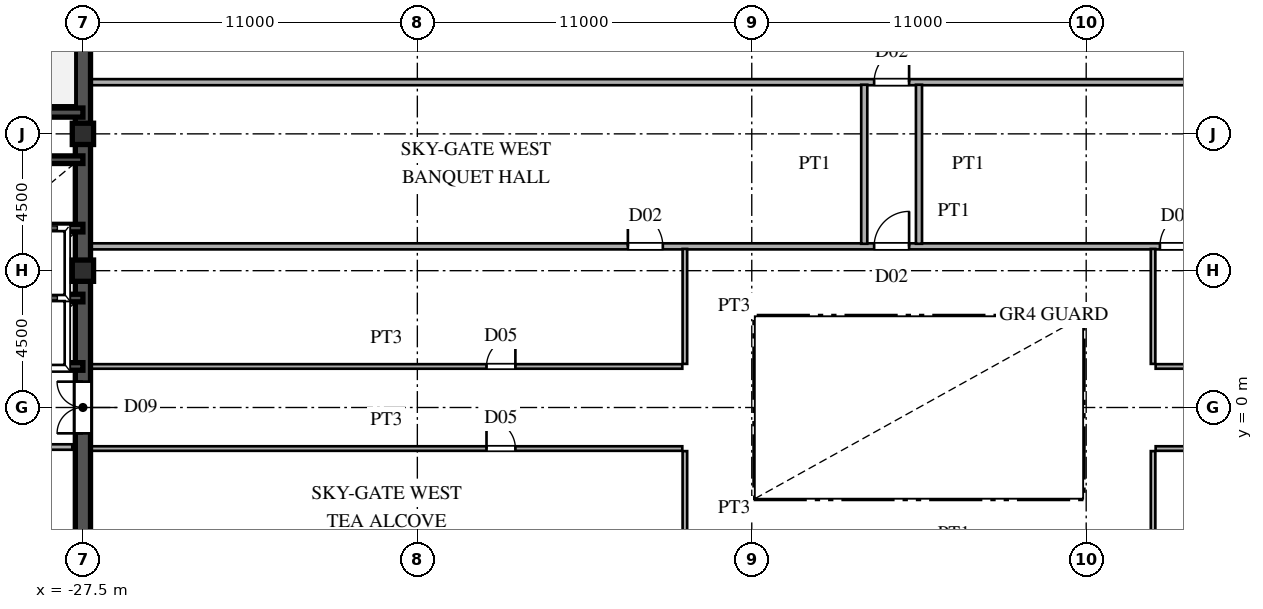
"""IFC4 building model, lengths in metres.
Left out: names, types, materials, properties, quantities, classifications, styles, units other than length and angle.
Written with IfcOpenShell. Run it as: python <this file> out.ifc"""

import sys

from ifc_helpers import new_model, si_unit, direction, frame, frame_2d, origin, origin_2d, place, context, subcontext, project, spatial, rectangle, hollow_rectangle, extrude, source, transform, mapped, element, fill, save


model = new_model("IFC4")
c1 = context("Model", 3, precision=1e-05, world=origin(), true_north=direction((0.0, 1.0)))
c2 = subcontext(c1, "Body", "Model", "MODEL_VIEW")
j1 = project(units=[si_unit("LENGTHUNIT", "METRE"), si_unit("PLANEANGLEUNIT", "RADIAN")], contexts=[c1])
p1 = place(None, origin())
s1 = spatial("IfcSite", under=j1, at=p1, CompositionType="ELEMENT")
p2 = place(p1, origin())
s2 = spatial("IfcBuilding", under=s1, at=p2, CompositionType="ELEMENT")
p3 = place(p2, frame((0.0, 0.0, 234.6)))
s3 = spatial("IfcBuildingStorey", under=s2, at=p3, CompositionType="ELEMENT", Elevation=234.6)
m1 = source(origin(), c2, "Body", "SweptSolid", [
    extrude(hollow_rectangle(XDim=0.7, YDim=0.7, WallThickness=0.03, at=origin_2d()), origin(), (0.0, 0.0, 1.0), 4.8),
])
for number, where, z_axis, x_axis in (
    (1, (-27.5, 4.5, 0.0), (0.0, 0.0, 1.0), (1.0, 0.0, 0.0)),
    (2, (-27.5, 9.0, 0.0), (0.0, 0.0, 1.0), (1.0, 0.0, 0.0)),
):
    element("IfcColumn", number, at=place(p3, frame(where, z_axis=z_axis, x_axis=x_axis)), inside=s3, PredefinedType="COLUMN", context=c2, shape_type="MappedRepresentation", body=[
        mapped(m1, transform((0.0, 0.0, 0.0), scale=1.0)),
    ])
for number, where, z_axis, x_axis in (
    (3, (-27.5, -13.5, 0.0), (0.0, 0.0, 1.0), (0.0, 1.0, 0.0)),
    (4, (-27.5, 1.3, 0.0), (0.0, 0.0, 1.0), (0.0, 1.0, 0.0)),
):
    element("IfcWall", number, at=place(p3, frame(where, z_axis=z_axis, x_axis=x_axis)), inside=s3, PredefinedType="SHEAR", context=c2, shape_type="SweptSolid", body=[
        extrude(rectangle(XDim=12.2, YDim=0.5, at=frame_2d((6.1, 0.0))), origin(), (0.0, 0.0, 1.0), 4.58),
    ])
p4 = place(p3, frame((-27.5, -1.3, 0.0), z_axis=(0.0, 0.0, 1.0), x_axis=(0.0, 1.0, 0.0)))
e5 = element("IfcWall", 5, at=p4, inside=s3, PredefinedType="SHEAR", context=c2, shape_type="SweptSolid", body=[
    extrude(rectangle(XDim=2.6, YDim=0.5, at=frame_2d((1.3, 0.0))), origin(), (0.0, 0.0, 1.0), 4.58),
])
p5 = place(p4, frame((0.45, 0.0, 0.0)))
e6 = element("IfcOpeningElement", 6, at=p5, cuts=e5, PredefinedType="OPENING", context=c2, shape_type="SweptSolid", body=[
    extrude(rectangle(XDim=1.7, YDim=2.35, at=frame_2d((0.85, 1.175))), frame((0.0, 0.26, 0.0), z_axis=(0.0, -1.0, 0.0), x_axis=(1.0, 0.0, 0.0)), (0.0, 0.0, 1.0), 0.52),
])
p6 = place(p3, frame((-36.5, 9.7, 0.0), z_axis=(0.0, 0.0, 1.0), x_axis=(1.0, 0.0, 0.0)))
e7 = element("IfcWall", 7, at=p6, inside=s3, PredefinedType="SHEAR", context=c2, shape_type="SweptSolid", body=[
    extrude(rectangle(XDim=9.0, YDim=0.3, at=frame_2d((4.5, 0.0))), origin(), (0.0, 0.0, 1.0), 4.58),
])
p7 = place(p6, frame((0.6, 0.0, 0.0)))
e8 = element("IfcOpeningElement", 8, at=p7, cuts=e7, PredefinedType="OPENING", context=c2, shape_type="SweptSolid", body=[
    extrude(rectangle(XDim=1.1, YDim=2.2, at=frame_2d((0.55, 1.1))), frame((0.0, 0.16, 0.0), z_axis=(0.0, -1.0, 0.0), x_axis=(1.0, 0.0, 0.0)), (0.0, 0.0, 1.0), 0.32),
])
for number, where, z_axis, x_axis in (
    (9, (-30.3, 1.35, 0.0), (0.0, 0.0, 1.0), (1.0, 0.0, 0.0)),
    (10, (-30.3, 3.6, 0.0), (0.0, 0.0, 1.0), (1.0, 0.0, 0.0)),
    (11, (-30.3, 5.9, 0.0), (0.0, 0.0, 1.0), (1.0, 0.0, 0.0)),
    (12, (-30.3, 8.15, 0.0), (0.0, 0.0, 1.0), (1.0, 0.0, 0.0)),
):
    element("IfcWall", number, at=place(p3, frame(where, z_axis=z_axis, x_axis=x_axis)), inside=s3, PredefinedType="SHEAR", context=c2, shape_type="SweptSolid", body=[
        extrude(rectangle(XDim=2.8, YDim=0.25, at=frame_2d((1.4, 0.0))), origin(), (0.0, 0.0, 1.0), 4.58),
    ])
p8 = place(p3, frame((-33.02, -1.3, 0.0), z_axis=(0.0, 0.0, 1.0), x_axis=(1.0, 0.0, 0.0)))
e13 = element("IfcWall", 13, at=p8, inside=s3, PredefinedType="PARTITIONING", context=c2, shape_type="SweptSolid", body=[
    extrude(rectangle(XDim=5.17, YDim=0.18, at=frame_2d((2.585, 0.0))), origin(), (0.0, 0.0, 1.0), 4.58),
])
p9 = place(p8, frame((2.01, 0.0, 0.0)))
e14 = element("IfcOpeningElement", 14, at=p9, cuts=e13, PredefinedType="OPENING", context=c2, shape_type="SweptSolid", body=[
    extrude(rectangle(XDim=1.15, YDim=2.2, at=frame_2d((0.575, 1.1))), frame((0.0, 0.1, 0.0), z_axis=(0.0, -1.0, 0.0), x_axis=(1.0, 0.0, 0.0)), (0.0, 0.0, 1.0), 0.2),
])
p10 = place(p3, frame((-27.245, -1.35, 0.0), z_axis=(0.0, 0.0, 1.0), x_axis=(1.0, 0.0, 0.0)))
e15 = element("IfcWall", 15, at=p10, inside=s3, PredefinedType="PARTITIONING", context=c2, shape_type="SweptSolid", body=[
    extrude(rectangle(XDim=19.46, YDim=0.15, at=frame_2d((9.73, 0.0))), origin(), (0.0, 0.0, 1.0), 4.58),
])
p11 = place(p10, frame((13.02, 0.0, 0.0)))
e16 = element("IfcOpeningElement", 16, at=p11, cuts=e15, PredefinedType="OPENING", context=c2, shape_type="SweptSolid", body=[
    extrude(rectangle(XDim=0.95, YDim=2.15, at=frame_2d((0.475, 1.075))), frame((0.0, 0.085, 0.0), z_axis=(0.0, -1.0, 0.0), x_axis=(1.0, 0.0, 0.0)), (0.0, 0.0, 1.0), 0.17),
])
p12 = place(p3, frame((7.785, -1.35, 0.0), z_axis=(0.0, 0.0, 1.0), x_axis=(1.0, 0.0, 0.0)))
e17 = element("IfcWall", 17, at=p12, inside=s3, PredefinedType="PARTITIONING", context=c2, shape_type="SweptSolid", body=[
    extrude(rectangle(XDim=19.46, YDim=0.15, at=frame_2d((9.73, 0.0))), origin(), (0.0, 0.0, 1.0), 4.58),
])
p13 = place(p12, frame((5.49, 0.0, 0.0)))
e18 = element("IfcOpeningElement", 18, at=p13, cuts=e17, PredefinedType="OPENING", context=c2, shape_type="SweptSolid", body=[
    extrude(rectangle(XDim=0.95, YDim=2.15, at=frame_2d((0.475, 1.075))), frame((0.0, 0.085, 0.0), z_axis=(0.0, -1.0, 0.0), x_axis=(1.0, 0.0, 0.0)), (0.0, 0.0, 1.0), 0.17),
])
p14 = place(p3, frame((-27.245, 1.35, 0.0), z_axis=(0.0, 0.0, 1.0), x_axis=(1.0, 0.0, 0.0)))
e19 = element("IfcWall", 19, at=p14, inside=s3, PredefinedType="PARTITIONING", context=c2, shape_type="SweptSolid", body=[
    extrude(rectangle(XDim=19.46, YDim=0.15, at=frame_2d((9.73, 0.0))), origin(), (0.0, 0.0, 1.0), 4.58),
])
p15 = place(p14, frame((13.02, 0.0, 0.0)))
e20 = element("IfcOpeningElement", 20, at=p15, cuts=e19, PredefinedType="OPENING", context=c2, shape_type="SweptSolid", body=[
    extrude(rectangle(XDim=0.95, YDim=2.15, at=frame_2d((0.475, 1.075))), frame((0.0, 0.085, 0.0), z_axis=(0.0, -1.0, 0.0), x_axis=(1.0, 0.0, 0.0)), (0.0, 0.0, 1.0), 0.17),
])
p16 = place(p3, frame((7.785, 1.35, 0.0), z_axis=(0.0, 0.0, 1.0), x_axis=(1.0, 0.0, 0.0)))
e21 = element("IfcWall", 21, at=p16, inside=s3, PredefinedType="PARTITIONING", context=c2, shape_type="SweptSolid", body=[
    extrude(rectangle(XDim=19.46, YDim=0.15, at=frame_2d((9.73, 0.0))), origin(), (0.0, 0.0, 1.0), 4.58),
])
p17 = place(p16, frame((5.49, 0.0, 0.0)))
e22 = element("IfcOpeningElement", 22, at=p17, cuts=e21, PredefinedType="OPENING", context=c2, shape_type="SweptSolid", body=[
    extrude(rectangle(XDim=0.95, YDim=2.15, at=frame_2d((0.475, 1.075))), frame((0.0, 0.085, 0.0), z_axis=(0.0, -1.0, 0.0), x_axis=(1.0, 0.0, 0.0)), (0.0, 0.0, 1.0), 0.17),
])
p18 = place(p3, frame((-27.245, 5.3, 0.0), z_axis=(0.0, 0.0, 1.0), x_axis=(1.0, 0.0, 0.0)))
e23 = element("IfcWall", 23, at=p18, inside=s3, PredefinedType="PARTITIONING", context=c2, shape_type="SweptSolid", body=[
    extrude(rectangle(XDim=54.49, YDim=0.2, at=frame_2d((27.245, 0.0))), origin(), (0.0, 0.0, 1.0), 4.58),
])
p19 = place(p18, frame((25.77, 0.0, 0.0)))
e24 = element("IfcOpeningElement", 24, at=p19, cuts=e23, PredefinedType="OPENING", context=c2, shape_type="SweptSolid", body=[
    extrude(rectangle(XDim=1.15, YDim=2.2, at=frame_2d((0.575, 1.1))), frame((0.0, 0.11, 0.0), z_axis=(0.0, -1.0, 0.0), x_axis=(1.0, 0.0, 0.0)), (0.0, 0.0, 1.0), 0.22),
])
p20 = place(p18, frame((35.17, 0.0, 0.0)))
e25 = element("IfcOpeningElement", 25, at=p20, cuts=e23, PredefinedType="OPENING", context=c2, shape_type="SweptSolid", body=[
    extrude(rectangle(XDim=1.15, YDim=2.2, at=frame_2d((0.575, 1.1))), frame((0.0, 0.11, 0.0), z_axis=(0.0, -1.0, 0.0), x_axis=(1.0, 0.0, 0.0)), (0.0, 0.0, 1.0), 0.22),
])
p21 = place(p18, frame((17.67, 0.0, 0.0)))
e26 = element("IfcOpeningElement", 26, at=p21, cuts=e23, PredefinedType="OPENING", context=c2, shape_type="SweptSolid", body=[
    extrude(rectangle(XDim=1.15, YDim=2.2, at=frame_2d((0.575, 1.1))), frame((0.0, 0.11, 0.0), z_axis=(0.0, -1.0, 0.0), x_axis=(1.0, 0.0, 0.0)), (0.0, 0.0, 1.0), 0.22),
])
p22 = place(p18, frame((46.055, 0.0, 0.0)))
e27 = element("IfcOpeningElement", 27, at=p22, cuts=e23, PredefinedType="OPENING", context=c2, shape_type="SweptSolid", body=[
    extrude(rectangle(XDim=0.88, YDim=2.1, at=frame_2d((0.44, 1.05))), frame((0.0, 0.11, 0.0), z_axis=(0.0, -1.0, 0.0), x_axis=(1.0, 0.0, 0.0)), (0.0, 0.0, 1.0), 0.22),
])
p23 = place(p18, frame((51.405, 0.0, 0.0)))
e28 = element("IfcOpeningElement", 28, at=p23, cuts=e23, PredefinedType="OPENING", context=c2, shape_type="SweptSolid", body=[
    extrude(rectangle(XDim=0.88, YDim=2.1, at=frame_2d((0.44, 1.05))), frame((0.0, 0.11, 0.0), z_axis=(0.0, -1.0, 0.0), x_axis=(1.0, 0.0, 0.0)), (0.0, 0.0, 1.0), 0.22),
])
p24 = place(p3, frame((-27.245, 10.7, 0.0), z_axis=(0.0, 0.0, 1.0), x_axis=(1.0, 0.0, 0.0)))
e29 = element("IfcWall", 29, at=p24, inside=s3, PredefinedType="PARTITIONING", context=c2, shape_type="SweptSolid", body=[
    extrude(rectangle(XDim=54.49, YDim=0.2, at=frame_2d((27.245, 0.0))), origin(), (0.0, 0.0, 1.0), 4.58),
])
p25 = place(p24, frame((25.77, 0.0, 0.0)))
e30 = element("IfcOpeningElement", 30, at=p25, cuts=e29, PredefinedType="OPENING", context=c2, shape_type="SweptSolid", body=[
    extrude(rectangle(XDim=1.15, YDim=2.2, at=frame_2d((0.575, 1.1))), frame((0.0, 0.11, 0.0), z_axis=(0.0, -1.0, 0.0), x_axis=(1.0, 0.0, 0.0)), (0.0, 0.0, 1.0), 0.22),
])
for number, where, z_axis, x_axis in (
    (31, (-7.7, -5.215, 0.0), (0.0, 0.0, 1.0), (0.0, 1.0, 0.0)),
    (32, (-7.7, 1.435, 0.0), (0.0, 0.0, 1.0), (0.0, 1.0, 0.0)),
):
    element("IfcWall", number, at=place(p3, frame(where, z_axis=z_axis, x_axis=x_axis)), inside=s3, PredefinedType="PARTITIONING", context=c2, shape_type="SweptSolid", body=[
        extrude(rectangle(XDim=3.78, YDim=0.15, at=frame_2d((1.89, 0.0))), origin(), (0.0, 0.0, 1.0), 4.58),
    ])
p26 = place(p3, frame((-1.8, 5.385, 0.0), z_axis=(0.0, 0.0, 1.0), x_axis=(0.0, 1.0, 0.0)))
e33 = element("IfcWall", 33, at=p26, inside=s3, PredefinedType="PARTITIONING", context=c2, shape_type="SweptSolid", body=[
    extrude(rectangle(XDim=5.23, YDim=0.2, at=frame_2d((2.615, 0.0))), origin(), (0.0, 0.0, 1.0), 4.58),
])
p27 = place(p3, frame((0.0, 5.385, 0.0), z_axis=(0.0, 0.0, 1.0), x_axis=(0.0, 1.0, 0.0)))
e34 = element("IfcWall", 34, at=p27, inside=s3, PredefinedType="PARTITIONING", context=c2, shape_type="SweptSolid", body=[
    extrude(rectangle(XDim=5.23, YDim=0.2, at=frame_2d((2.615, 0.0))), origin(), (0.0, 0.0, 1.0), 3.48),
])
for number, where, z_axis, x_axis in (
    (35, (7.7, -5.215, 0.0), (0.0, 0.0, 1.0), (0.0, 1.0, 0.0)),
    (36, (7.7, 1.435, 0.0), (0.0, 0.0, 1.0), (0.0, 1.0, 0.0)),
):
    element("IfcWall", number, at=place(p3, frame(where, z_axis=z_axis, x_axis=x_axis)), inside=s3, PredefinedType="PARTITIONING", context=c2, shape_type="SweptSolid", body=[
        extrude(rectangle(XDim=3.78, YDim=0.15, at=frame_2d((1.89, 0.0))), origin(), (0.0, 0.0, 1.0), 4.58),
    ])
m2 = source(origin(), c2, "Body", "SweptSolid", [
    extrude(rectangle(XDim=1.7, YDim=2.35, at=frame_2d((0.85, 1.175))), frame((0.0, 0.025, 0.0), z_axis=(0.0, -1.0, 0.0), x_axis=(1.0, 0.0, 0.0)), (0.0, 0.0, 1.0), 0.05),
])
p28 = place(p5, origin())
e37 = element("IfcDoor", 37, at=p28, inside=s3, OperationType="DOUBLE_SWING_LEFT", PredefinedType="DOOR", context=c2, shape_type="MappedRepresentation", body=[
    mapped(m2, transform((0.0, 0.0, 0.0), scale=1.0)),
])
fill(e6, e37)
m3 = source(origin(), c2, "Body", "SweptSolid", [
    extrude(rectangle(XDim=0.95, YDim=2.15, at=frame_2d((0.475, 1.075))), frame((0.0, 0.025, 0.0), z_axis=(0.0, -1.0, 0.0), x_axis=(1.0, 0.0, 0.0)), (0.0, 0.0, 1.0), 0.05),
])
p29 = place(p11, origin())
e38 = element("IfcDoor", 38, at=p29, inside=s3, OperationType="SINGLE_SWING_LEFT", PredefinedType="DOOR", context=c2, shape_type="MappedRepresentation", body=[
    mapped(m3, transform((0.0, 0.0, 0.0), scale=1.0)),
])
fill(e16, e38)
p30 = place(p15, origin())
e39 = element("IfcDoor", 39, at=p30, inside=s3, OperationType="SINGLE_SWING_RIGHT", PredefinedType="DOOR", context=c2, shape_type="MappedRepresentation", body=[
    mapped(m3, transform((0.0, 0.0, 0.0), scale=1.0)),
])
fill(e20, e39)
m4 = source(origin(), c2, "Body", "SweptSolid", [
    extrude(rectangle(XDim=1.15, YDim=2.2, at=frame_2d((0.575, 1.1))), frame((0.0, 0.025, 0.0), z_axis=(0.0, -1.0, 0.0), x_axis=(1.0, 0.0, 0.0)), (0.0, 0.0, 1.0), 0.05),
])
p31 = place(p19, origin())
e40 = element("IfcDoor", 40, at=p31, inside=s3, OperationType="SINGLE_SWING_RIGHT", PredefinedType="DOOR", context=c2, shape_type="MappedRepresentation", body=[
    mapped(m4, transform((0.0, 0.0, 0.0), scale=1.0)),
])
fill(e24, e40)
p32 = place(p20, origin())
e41 = element("IfcDoor", 41, at=p32, inside=s3, OperationType="SINGLE_SWING_RIGHT", PredefinedType="DOOR", context=c2, shape_type="MappedRepresentation", body=[
    mapped(m4, transform((0.0, 0.0, 0.0), scale=1.0)),
])
fill(e25, e41)
p33 = place(p21, origin())
e42 = element("IfcDoor", 42, at=p33, inside=s3, OperationType="SINGLE_SWING_LEFT", PredefinedType="DOOR", context=c2, shape_type="MappedRepresentation", body=[
    mapped(m4, transform((0.0, 0.0, 0.0), scale=1.0)),
])
fill(e26, e42)
p34 = place(p25, origin())
e43 = element("IfcDoor", 43, at=p34, inside=s3, OperationType="SINGLE_SWING_RIGHT", PredefinedType="DOOR", context=c2, shape_type="MappedRepresentation", body=[
    mapped(m4, transform((0.0, 0.0, 0.0), scale=1.0)),
])
fill(e30, e43)
save(model, sys.argv[1])
